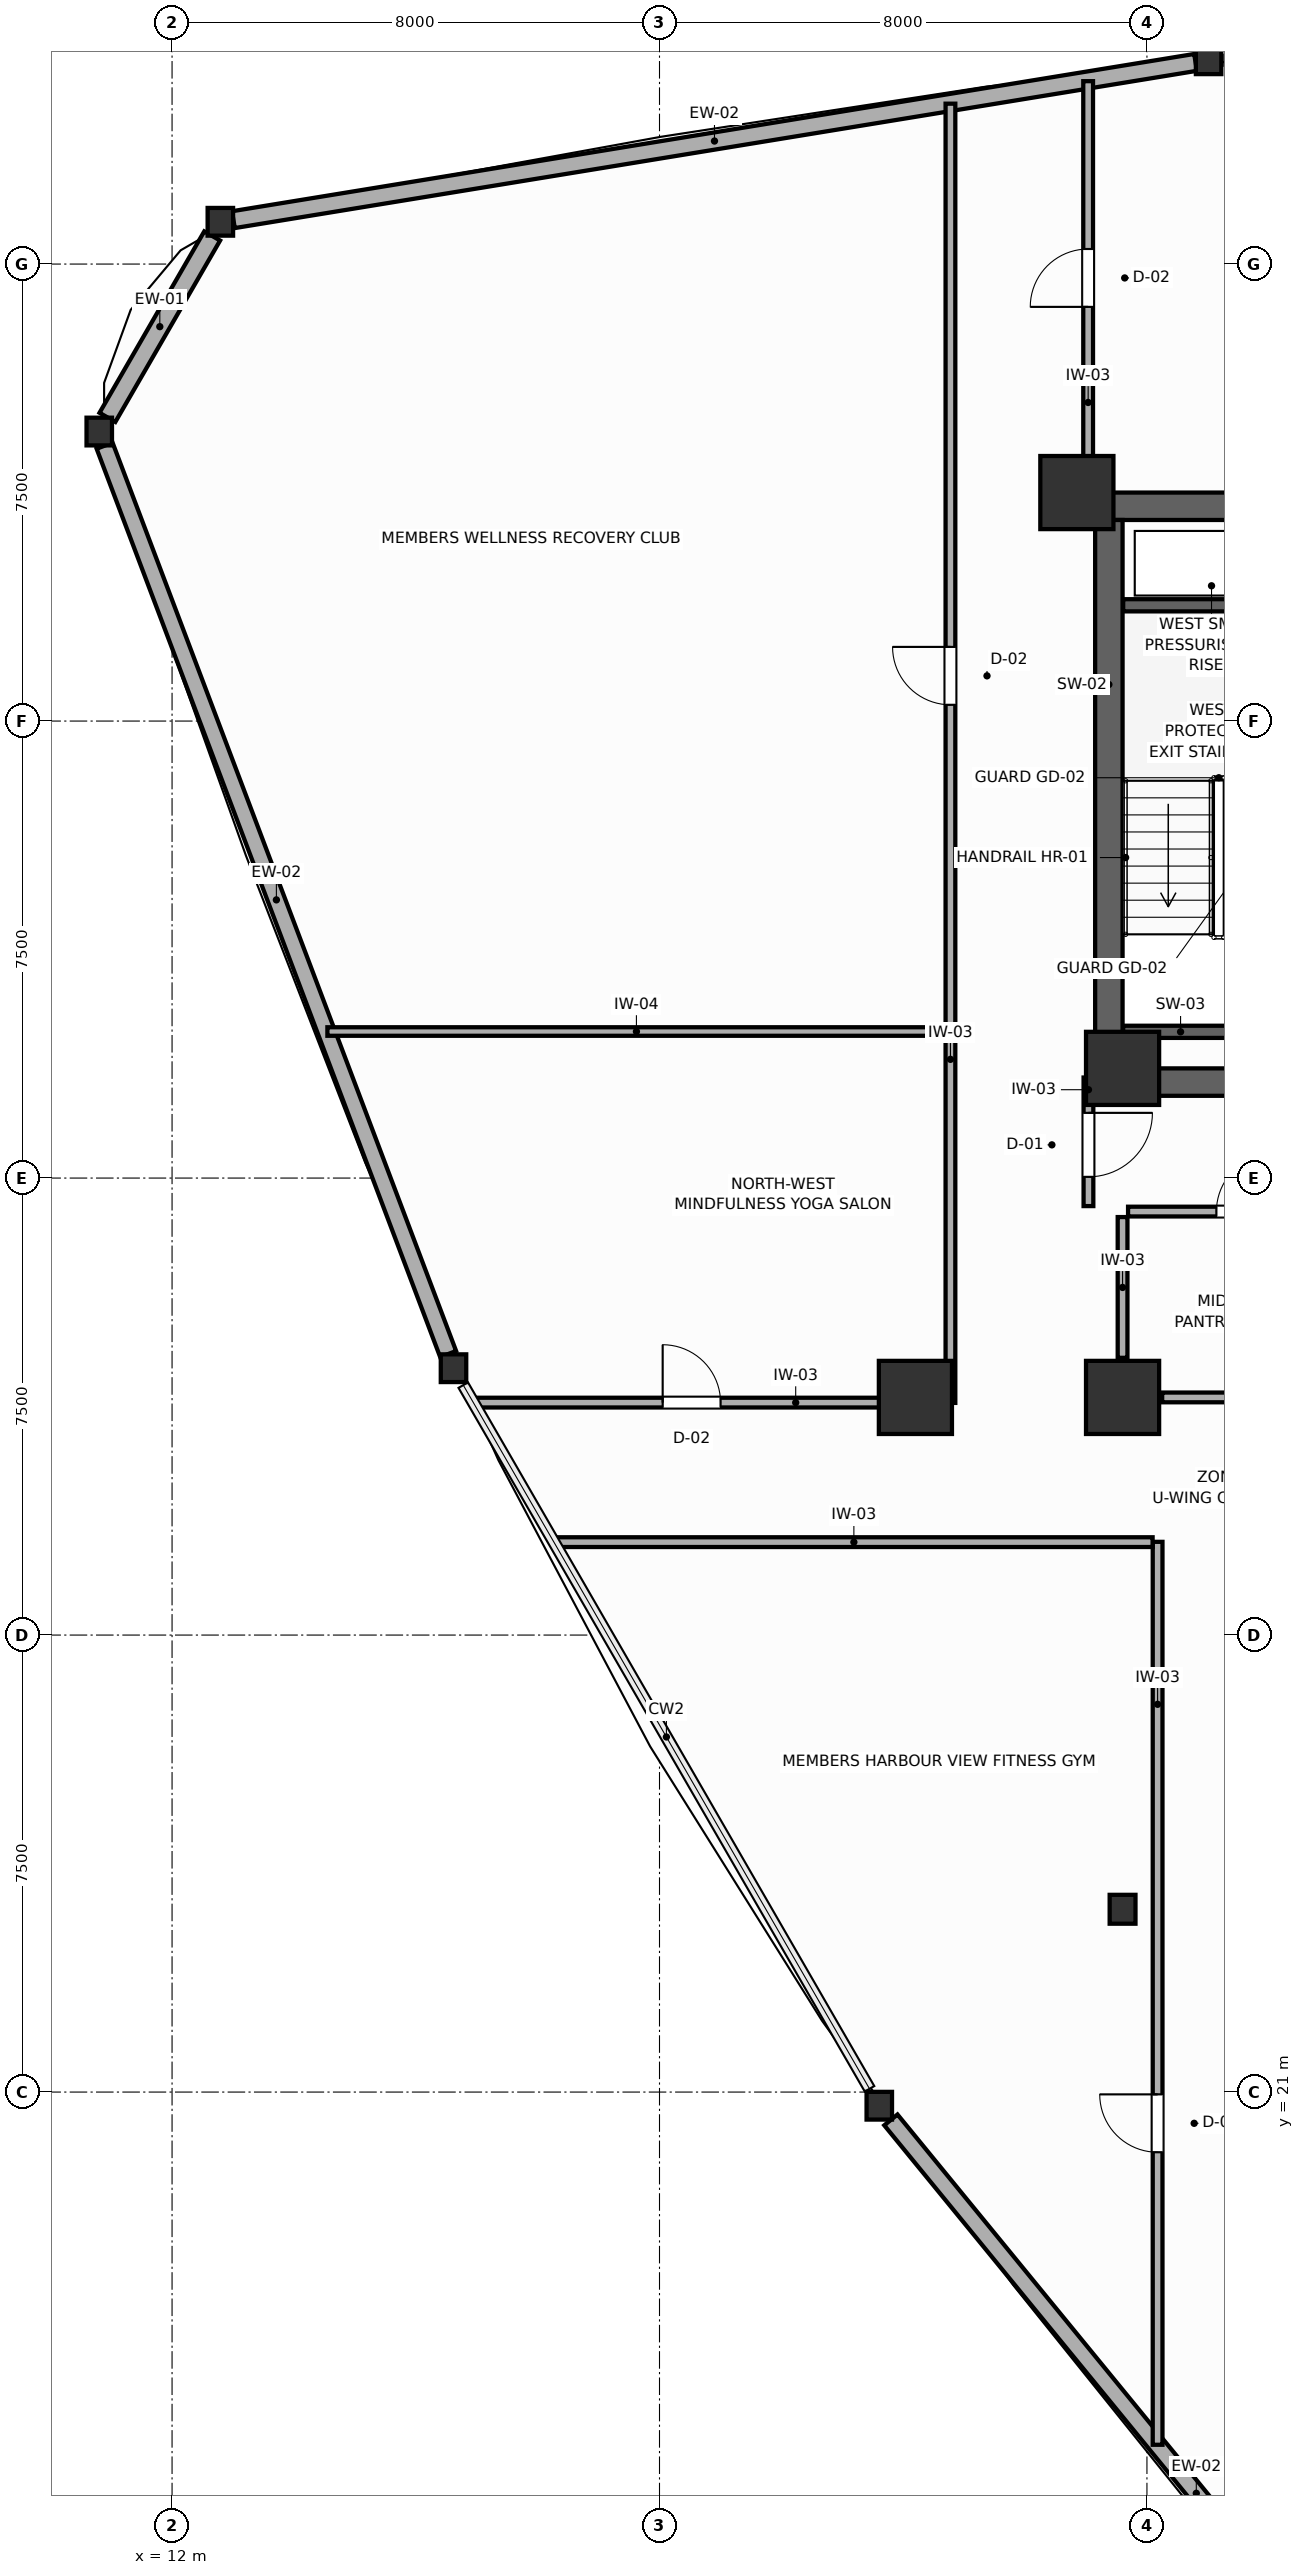
"""IFC4 building model, lengths in metres.
Left out: names, types, materials, properties, quantities, classifications, styles, units other than length and angle.
Written with IfcOpenShell. Run it as: python <this file> out.ifc"""

import sys

from ifc_helpers import new_model, si_unit, direction, frame, frame_2d, origin, origin_2d, place, context, subcontext, project, spatial, rectangle, i_section, extrude, source, transform, mapped, element, fill, save


model = new_model("IFC4")
c1 = context("Model", 3, precision=1e-05, world=origin(), true_north=direction((0.0, 1.0)))
c2 = subcontext(c1, "Body", "Model", "MODEL_VIEW")
j1 = project(units=[si_unit("LENGTHUNIT", "METRE"), si_unit("PLANEANGLEUNIT", "RADIAN")], contexts=[c1])
p1 = place(None, origin())
s1 = spatial("IfcSite", under=j1, at=p1, CompositionType="ELEMENT")
p2 = place(p1, origin())
s2 = spatial("IfcBuilding", under=s1, at=p2, CompositionType="ELEMENT")
p3 = place(p2, frame((0.0, 0.0, 113.4)))
s3 = spatial("IfcBuildingStorey", under=s2, at=p3, CompositionType="ELEMENT", Elevation=113.4)
p4 = place(p3, frame((27.15, 47.025, 0.0), z_axis=(0.0, 0.0, 1.0), x_axis=(1.0, 0.0, 0.0)))
e1 = element("IfcWall", 1, at=p4, inside=s3, PredefinedType="SHEAR", context=c2, shape_type="SweptSolid", body=[
    extrude(rectangle(XDim=17.7, YDim=0.45, at=frame_2d((8.85, 0.0))), origin(), (0.0, 0.0, 1.0), 3.6),
])
p5 = place(p3, frame((27.15, 37.575, 0.0), z_axis=(0.0, 0.0, 1.0), x_axis=(1.0, 0.0, 0.0)))
e2 = element("IfcWall", 2, at=p5, inside=s3, PredefinedType="SHEAR", context=c2, shape_type="SweptSolid", body=[
    extrude(rectangle(XDim=17.7, YDim=0.45, at=frame_2d((8.85, 0.0))), origin(), (0.0, 0.0, 1.0), 3.6),
])
p6 = place(p5, frame((4.875, 0.0, 0.0)))
e3 = element("IfcOpeningElement", 3, at=p6, cuts=e2, PredefinedType="OPENING", context=c2, shape_type="SweptSolid", body=[
    extrude(rectangle(XDim=1.05, YDim=2.1, at=frame_2d((0.525, 1.05))), frame((0.0, 0.235, 0.0), z_axis=(0.0, -1.0, 0.0), x_axis=(1.0, 0.0, 0.0)), (0.0, 0.0, 1.0), 0.47),
])
p7 = place(p5, frame((11.775, 0.0, 0.0)))
e4 = element("IfcOpeningElement", 4, at=p7, cuts=e2, PredefinedType="OPENING", context=c2, shape_type="SweptSolid", body=[
    extrude(rectangle(XDim=1.05, YDim=2.1, at=frame_2d((0.525, 1.05))), frame((0.0, 0.235, 0.0), z_axis=(0.0, -1.0, 0.0), x_axis=(1.0, 0.0, 0.0)), (0.0, 0.0, 1.0), 0.47),
])
p8 = place(p3, frame((27.375, 37.8, 0.0), z_axis=(0.0, 0.0, 1.0), x_axis=(0.0, 1.0, 0.0)))
e5 = element("IfcWall", 5, at=p8, inside=s3, PredefinedType="SHEAR", context=c2, shape_type="SweptSolid", body=[
    extrude(rectangle(XDim=9.0, YDim=0.45, at=frame_2d((4.5, 0.0))), origin(), (0.0, 0.0, 1.0), 3.6),
])
m1 = source(origin(), c2, "Body", "SweptSolid", [
    extrude(rectangle(XDim=1.2, YDim=1.2, at=origin_2d()), origin(), (0.0, 0.0, 1.0), 3.6),
])
for number, where, z_axis, x_axis in (
    (6, (26.85, 47.25, 0.0), (0.0, 0.0, 1.0), (1.0, 0.0, 0.0)),
    (7, (27.6, 37.8, 0.0), (0.0, 0.0, 1.0), (1.0, 0.0, 0.0)),
    (8, (27.6, 32.4, 0.0), (0.0, 0.0, 1.0), (1.0, 0.0, 0.0)),
    (9, (24.2, 32.4, 0.0), (0.0, 0.0, 1.0), (1.0, 0.0, 0.0)),
):
    element("IfcColumn", number, at=place(p3, frame(where, z_axis=z_axis, x_axis=x_axis)), inside=s3, PredefinedType="COLUMN", context=c2, shape_type="MappedRepresentation", body=[
        mapped(m1, transform((0.0, 0.0, 0.0), scale=1.0)),
    ])
m2 = source(origin(), c2, "Body", "SweptSolid", [
    extrude(i_section(OverallWidth=0.424, OverallDepth=0.474, WebThickness=0.045, FlangeThickness=0.072, FilletRadius=0.015, at=origin_2d()), origin(), (0.0, 0.0, 1.0), 3.6),
])
p9 = place(p3, frame((27.6, 24.0, 0.0), z_axis=(0.0, 0.0, 1.0), x_axis=(1.0, 0.0, 0.0)))
e10 = element("IfcColumn", 10, at=p9, inside=s3, PredefinedType="COLUMN", context=c2, shape_type="MappedRepresentation", body=[
    mapped(m2, transform((0.0, 0.0, 0.0), scale=1.0)),
])
m3 = source(origin(), c2, "Body", "SweptSolid", [
    extrude(i_section(OverallWidth=0.418, OverallDepth=0.455, WebThickness=0.039, FlangeThickness=0.063, FilletRadius=0.015, at=origin_2d()), origin(), (0.0, 0.0, 1.0), 3.6),
])
for number, where, z_axis, x_axis in (
    (11, (29.012, 54.344, 0.0), (0.0, 0.0, 1.0), (1.0, 0.0, 0.0)),
    (12, (12.792, 51.694, 0.0), (0.0, 0.0, 1.0), (1.0, 0.0, 0.0)),
    (13, (10.805, 48.251, 0.0), (0.0, 0.0, 1.0), (1.0, 0.0, 0.0)),
    (14, (16.619, 32.879, 0.0), (0.0, 0.0, 1.0), (1.0, 0.0, 0.0)),
    (15, (23.607, 20.776, 0.0), (0.0, 0.0, 1.0), (1.0, 0.0, 0.0)),
):
    element("IfcColumn", number, at=place(p3, frame(where, z_axis=z_axis, x_axis=x_axis)), inside=s3, PredefinedType="COLUMN", context=c2, shape_type="MappedRepresentation", body=[
        mapped(m3, transform((0.0, 0.0, 0.0), scale=1.0)),
    ])
p10 = place(p3, frame((28.798, 54.31, 0.0), z_axis=(0.0, 0.0, 1.0), x_axis=(-0.98690696995, -0.161290522546, 0.0)))
e16 = element("IfcWall", 16, at=p10, inside=s3, PredefinedType="SOLIDWALL", context=c2, shape_type="SweptSolid", body=[
    extrude(rectangle(XDim=16.001, YDim=0.28, at=frame_2d((8.0, 0.0))), origin(), (0.0, 0.0, 1.0), 1.87),
])
p11 = place(p3, frame((12.658, 51.461, 0.0), z_axis=(0.0, 0.0, 1.0), x_axis=(-0.500064626416, -0.86598808849, 0.0)))
e17 = element("IfcWall", 17, at=p11, inside=s3, PredefinedType="SOLIDWALL", context=c2, shape_type="SweptSolid", body=[
    extrude(rectangle(XDim=3.438, YDim=0.3, at=frame_2d((1.719, 0.0))), origin(), (0.0, 0.0, 1.0), 1.87),
])
p12 = place(p3, frame((10.893, 48.019, 0.0), z_axis=(0.0, 0.0, 1.0), x_axis=(0.353771130195, -0.935332019895, 0.0)))
e18 = element("IfcWall", 18, at=p12, inside=s3, PredefinedType="SOLIDWALL", context=c2, shape_type="SweptSolid", body=[
    extrude(rectangle(XDim=15.937, YDim=0.28, at=frame_2d((7.969, 0.0))), origin(), (0.0, 0.0, 1.0), 1.87),
])
p13 = place(p3, frame((23.797, 20.543, 0.0), z_axis=(0.0, 0.0, 1.0), x_axis=(0.633140387555, -0.774036982092, 0.0)))
e19 = element("IfcWall", 19, at=p13, inside=s3, PredefinedType="SOLIDWALL", context=c2, shape_type="SweptSolid", body=[
    extrude(rectangle(XDim=15.834, YDim=0.28, at=frame_2d((7.917, 0.0))), origin(), (0.0, 0.0, 1.0), 1.87),
])
for number, where, z_axis, x_axis in (
    (20, (27.61, 45.4, 0.0), (0.0, 0.0, 1.0), (1.0, 0.0, 0.0)),
    (21, (27.61, 38.4, 0.0), (0.0, 0.0, 1.0), (1.0, 0.0, 0.0)),
):
    element("IfcWall", number, at=place(p3, frame(where, z_axis=z_axis, x_axis=x_axis)), inside=s3, PredefinedType="SHEAR", context=c2, shape_type="SweptSolid", body=[
        extrude(rectangle(XDim=3.14, YDim=0.2, at=frame_2d((1.57, 0.0))), origin(), (0.0, 0.0, 1.0), 3.6),
    ])
p14 = place(p3, frame((28.25, 32.4, 0.0), z_axis=(0.0, 0.0, 1.0), x_axis=(1.0, 0.0, 0.0)))
e22 = element("IfcWall", 22, at=p14, inside=s3, PredefinedType="PARTITIONING", context=c2, shape_type="SweptSolid", body=[
    extrude(rectangle(XDim=3.45, YDim=0.16, at=frame_2d((1.725, 0.0))), origin(), (0.0, 0.0, 1.0), 2.16),
])
p15 = place(p3, frame((27.6, 33.05, 0.0), z_axis=(0.0, 0.0, 1.0), x_axis=(0.0, 1.0, 0.0)))
e23 = element("IfcWall", 23, at=p15, inside=s3, PredefinedType="PARTITIONING", context=c2, shape_type="SweptSolid", body=[
    extrude(rectangle(XDim=2.31, YDim=0.16, at=frame_2d((1.155, 0.0))), origin(), (0.0, 0.0, 1.0), 3.4),
])
p16 = place(p3, frame((27.69, 35.45, 0.0), z_axis=(0.0, 0.0, 1.0), x_axis=(1.0, 0.0, 0.0)))
e24 = element("IfcWall", 24, at=p16, inside=s3, PredefinedType="PARTITIONING", context=c2, shape_type="SweptSolid", body=[
    extrude(rectangle(XDim=4.01, YDim=0.16, at=frame_2d((2.005, 0.0))), origin(), (0.0, 0.0, 1.0), 3.4),
])
p17 = place(p16, frame((1.45, 0.0, 0.0)))
e25 = element("IfcOpeningElement", 25, at=p17, cuts=e24, PredefinedType="OPENING", context=c2, shape_type="SweptSolid", body=[
    extrude(rectangle(XDim=0.95, YDim=2.05, at=frame_2d((0.475, 1.025))), frame((0.0, 0.09, 0.0), z_axis=(0.0, -1.0, 0.0), x_axis=(1.0, 0.0, 0.0)), (0.0, 0.0, 1.0), 0.18),
])
p18 = place(p3, frame((27.04, 35.54, 0.0), z_axis=(0.0, 0.0, 1.0), x_axis=(0.0, 1.0, 0.0)))
e26 = element("IfcWall", 26, at=p18, inside=s3, PredefinedType="PARTITIONING", context=c2, shape_type="SweptSolid", body=[
    extrude(rectangle(XDim=2.11, YDim=0.16, at=frame_2d((1.055, 0.0))), origin(), (0.0, 0.0, 1.0), 3.4),
])
p19 = place(p18, frame((0.48, 0.0, 0.0)))
e27 = element("IfcOpeningElement", 27, at=p19, cuts=e26, PredefinedType="OPENING", context=c2, shape_type="SweptSolid", body=[
    extrude(rectangle(XDim=1.05, YDim=2.1, at=frame_2d((0.525, 1.05))), frame((0.0, 0.09, 0.0), z_axis=(0.0, -1.0, 0.0), x_axis=(1.0, 0.0, 0.0)), (0.0, 0.0, 1.0), 0.18),
])
p20 = place(p3, frame((24.775, 32.31, 0.0), z_axis=(0.0, 0.0, 1.0), x_axis=(0.0, 1.0, 0.0)))
e28 = element("IfcWall", 28, at=p20, inside=s3, PredefinedType="PARTITIONING", context=c2, shape_type="SweptSolid", body=[
    extrude(rectangle(XDim=21.322, YDim=0.16, at=frame_2d((10.661, 0.0))), origin(), (0.0, 0.0, 1.0), 3.4),
])
p21 = place(p20, frame((11.457, 0.0, 0.0)))
e29 = element("IfcOpeningElement", 29, at=p21, cuts=e28, PredefinedType="OPENING", context=c2, shape_type="SweptSolid", body=[
    extrude(rectangle(XDim=0.95, YDim=2.05, at=frame_2d((0.475, 1.025))), frame((0.0, 0.09, 0.0), z_axis=(0.0, -1.0, 0.0), x_axis=(1.0, 0.0, 0.0)), (0.0, 0.0, 1.0), 0.18),
])
p22 = place(p3, frame((28.175, 15.212, 0.0), z_axis=(0.0, 0.0, 1.0), x_axis=(0.0, 1.0, 0.0)))
e30 = element("IfcWall", 30, at=p22, inside=s3, PredefinedType="PARTITIONING", context=c2, shape_type="SweptSolid", body=[
    extrude(rectangle(XDim=14.818, YDim=0.16, at=frame_2d((7.409, 0.0))), origin(), (0.0, 0.0, 1.0), 3.4),
])
p23 = place(p22, frame((4.801, 0.0, 0.0)))
e31 = element("IfcOpeningElement", 31, at=p23, cuts=e30, PredefinedType="OPENING", context=c2, shape_type="SweptSolid", body=[
    extrude(rectangle(XDim=0.95, YDim=2.05, at=frame_2d((0.475, 1.025))), frame((0.0, 0.09, 0.0), z_axis=(0.0, -1.0, 0.0), x_axis=(1.0, 0.0, 0.0)), (0.0, 0.0, 1.0), 0.18),
])
p24 = place(p3, frame((18.287, 30.025, 0.0), z_axis=(0.0, 0.0, 1.0), x_axis=(1.0, 0.0, 0.0)))
e32 = element("IfcWall", 32, at=p24, inside=s3, PredefinedType="PARTITIONING", context=c2, shape_type="SweptSolid", body=[
    extrude(rectangle(XDim=9.806, YDim=0.16, at=frame_2d((4.903, 0.0))), origin(), (0.0, 0.0, 1.0), 3.4),
])
p25 = place(p3, frame((16.965, 32.315, 0.0), z_axis=(0.0, 0.0, 1.0), x_axis=(1.0, 0.0, 0.0)))
e33 = element("IfcWall", 33, at=p25, inside=s3, PredefinedType="PARTITIONING", context=c2, shape_type="SweptSolid", body=[
    extrude(rectangle(XDim=7.728, YDim=0.16, at=frame_2d((3.864, 0.0))), origin(), (0.0, 0.0, 1.0), 2.16),
])
p26 = place(p25, frame((3.087, 0.0, 0.0)))
e34 = element("IfcOpeningElement", 34, at=p26, cuts=e33, PredefinedType="OPENING", context=c2, shape_type="SweptSolid", body=[
    extrude(rectangle(XDim=0.95, YDim=2.05, at=frame_2d((0.475, 1.025))), frame((0.0, 0.09, 0.0), z_axis=(0.0, -1.0, 0.0), x_axis=(1.0, 0.0, 0.0)), (0.0, 0.0, 1.0), 0.18),
])
p27 = place(p3, frame((27.035, 47.34, 0.0), z_axis=(0.0, 0.0, 1.0), x_axis=(0.0, 1.0, 0.0)))
e35 = element("IfcWall", 35, at=p27, inside=s3, PredefinedType="PARTITIONING", context=c2, shape_type="SweptSolid", body=[
    extrude(rectangle(XDim=6.661, YDim=0.16, at=frame_2d((3.331, 0.0))), origin(), (0.0, 0.0, 1.0), 2.16),
])
p28 = place(p27, frame((2.957, 0.0, 0.0)))
e36 = element("IfcOpeningElement", 36, at=p28, cuts=e35, PredefinedType="OPENING", context=c2, shape_type="SweptSolid", body=[
    extrude(rectangle(XDim=0.95, YDim=2.05, at=frame_2d((0.475, 1.025))), frame((0.0, 0.09, 0.0), z_axis=(0.0, -1.0, 0.0), x_axis=(1.0, 0.0, 0.0)), (0.0, 0.0, 1.0), 0.18),
])
p29 = place(p3, frame((14.549, 38.405, 0.0), z_axis=(0.0, 0.0, 1.0), x_axis=(1.0, 0.0, 0.0)))
e37 = element("IfcWall", 37, at=p29, inside=s3, PredefinedType="PARTITIONING", context=c2, shape_type="SweptSolid", body=[
    extrude(rectangle(XDim=10.144, YDim=0.14, at=frame_2d((5.072, 0.0))), origin(), (0.0, 0.0, 1.0), 3.4),
])
p30 = place(p17, origin())
e38 = element("IfcDoor", 38, at=p30, inside=s3, OperationType="SINGLE_SWING_RIGHT", PredefinedType="DOOR", context=c2, shape_type="SweptSolid", body=[
    extrude(rectangle(XDim=0.95, YDim=2.05, at=frame_2d((0.475, 1.025))), frame((0.0, 0.025, 0.0), z_axis=(0.0, -1.0, 0.0), x_axis=(1.0, 0.0, 0.0)), (0.0, 0.0, 1.0), 0.05),
])
fill(e25, e38)
p31 = place(p19, frame((1.05, 0.0, 0.0), z_axis=(0.0, 0.0, 1.0), x_axis=(-1.0, 0.0, 0.0)))
e39 = element("IfcDoor", 39, at=p31, inside=s3, OperationType="SINGLE_SWING_LEFT", PredefinedType="DOOR", context=c2, shape_type="SweptSolid", body=[
    extrude(rectangle(XDim=1.05, YDim=2.1, at=frame_2d((0.525, 1.05))), frame((0.0, 0.025, 0.0), z_axis=(0.0, -1.0, 0.0), x_axis=(1.0, 0.0, 0.0)), (0.0, 0.0, 1.0), 0.05),
])
fill(e27, e39)
p32 = place(p21, origin())
e40 = element("IfcDoor", 40, at=p32, inside=s3, OperationType="SINGLE_SWING_RIGHT", PredefinedType="DOOR", context=c2, shape_type="SweptSolid", body=[
    extrude(rectangle(XDim=0.95, YDim=2.05, at=frame_2d((0.475, 1.025))), frame((0.0, 0.025, 0.0), z_axis=(0.0, -1.0, 0.0), x_axis=(1.0, 0.0, 0.0)), (0.0, 0.0, 1.0), 0.05),
])
fill(e29, e40)
p33 = place(p23, origin())
e41 = element("IfcDoor", 41, at=p33, inside=s3, OperationType="SINGLE_SWING_RIGHT", PredefinedType="DOOR", context=c2, shape_type="SweptSolid", body=[
    extrude(rectangle(XDim=0.95, YDim=2.05, at=frame_2d((0.475, 1.025))), frame((0.0, 0.025, 0.0), z_axis=(0.0, -1.0, 0.0), x_axis=(1.0, 0.0, 0.0)), (0.0, 0.0, 1.0), 0.05),
])
fill(e31, e41)
p34 = place(p26, origin())
e42 = element("IfcDoor", 42, at=p34, inside=s3, OperationType="SINGLE_SWING_LEFT", PredefinedType="DOOR", context=c2, shape_type="SweptSolid", body=[
    extrude(rectangle(XDim=0.95, YDim=2.05, at=frame_2d((0.475, 1.025))), frame((0.0, 0.025, 0.0), z_axis=(0.0, -1.0, 0.0), x_axis=(1.0, 0.0, 0.0)), (0.0, 0.0, 1.0), 0.05),
])
fill(e34, e42)
p35 = place(p28, origin())
e43 = element("IfcDoor", 43, at=p35, inside=s3, OperationType="SINGLE_SWING_LEFT", PredefinedType="DOOR", context=c2, shape_type="SweptSolid", body=[
    extrude(rectangle(XDim=0.95, YDim=2.05, at=frame_2d((0.475, 1.025))), frame((0.0, 0.025, 0.0), z_axis=(0.0, -1.0, 0.0), x_axis=(1.0, 0.0, 0.0)), (0.0, 0.0, 1.0), 0.05),
])
fill(e36, e43)
save(model, sys.argv[1])
